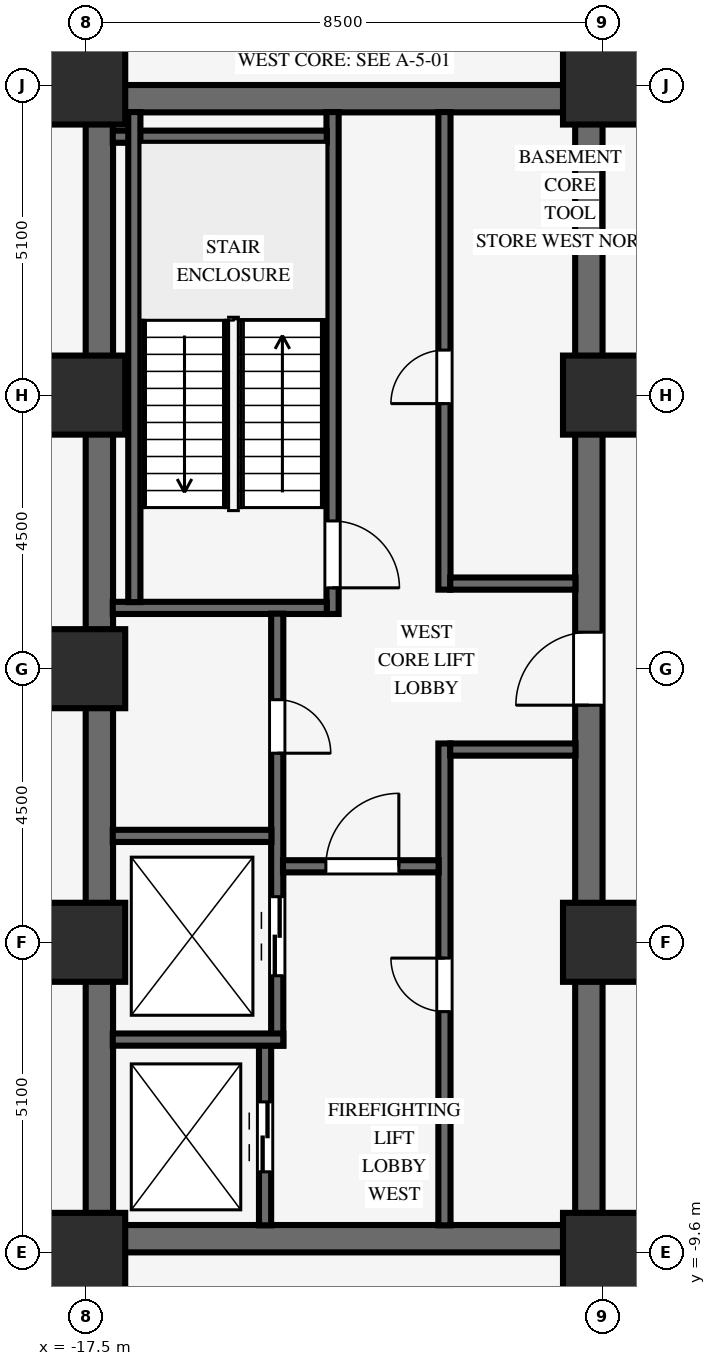
"""IFC4 building model, lengths in metres.
Left out: names, types, materials, properties, quantities, classifications, styles, units other than length and angle.
Written with IfcOpenShell. Run it as: python <this file> out.ifc"""

import sys

from ifc_helpers import new_model, si_unit, direction, frame, frame_2d, origin, origin_2d, place, context, subcontext, project, spatial, rectangle, extrude, source, transform, mapped, element, fill, save


model = new_model("IFC4")
c1 = context("Model", 3, precision=1e-05, world=origin(), true_north=direction((0.0, 1.0)))
c2 = subcontext(c1, "Body", "Model", "MODEL_VIEW")
j1 = project(units=[si_unit("LENGTHUNIT", "METRE"), si_unit("PLANEANGLEUNIT", "RADIAN")], contexts=[c1])
p1 = place(None, origin())
s1 = spatial("IfcSite", under=j1, at=p1, CompositionType="ELEMENT")
p2 = place(p1, origin())
s2 = spatial("IfcBuilding", under=s1, at=p2, CompositionType="ELEMENT")
p3 = place(p2, frame((0.0, 0.0, -8.4)))
s3 = spatial("IfcBuildingStorey", under=s2, at=p3, CompositionType="ELEMENT", Elevation=-8.4)
for number, where, z_axis, x_axis in (
    (1, (-17.5, -9.375, 0.0), (0.0, 0.0, 1.0), (1.0, 0.0, 0.0)),
    (2, (-17.5, 9.375, 0.0), (0.0, 0.0, 1.0), (1.0, 0.0, 0.0)),
):
    element("IfcWall", number, at=place(p3, frame(where, z_axis=z_axis, x_axis=x_axis)), inside=s3, PredefinedType="SHEAR", context=c2, shape_type="SweptSolid", body=[
        extrude(rectangle(XDim=8.5, YDim=0.45, at=frame_2d((4.25, 0.0))), origin(), (0.0, 0.0, 1.0), 3.85),
    ])
p4 = place(p3, frame((-17.275, -9.155, 0.0), z_axis=(0.0, 0.0, 1.0), x_axis=(0.0, 1.0, 0.0)))
e3 = element("IfcWall", 3, at=p4, inside=s3, PredefinedType="SHEAR", context=c2, shape_type="SweptSolid", body=[
    extrude(rectangle(XDim=18.31, YDim=0.45, at=frame_2d((9.155, 0.0))), origin(), (0.0, 0.0, 1.0), 3.85),
])
p5 = place(p3, frame((-9.225, -9.155, 0.0), z_axis=(0.0, 0.0, 1.0), x_axis=(0.0, 1.0, 0.0)))
e4 = element("IfcWall", 4, at=p5, inside=s3, PredefinedType="SHEAR", context=c2, shape_type="SweptSolid", body=[
    extrude(rectangle(XDim=18.31, YDim=0.45, at=frame_2d((9.155, 0.0))), origin(), (0.0, 0.0, 1.0), 3.85),
])
p6 = place(p5, frame((8.555, 0.0, 0.0)))
e5 = element("IfcOpeningElement", 5, at=p6, cuts=e4, PredefinedType="OPENING", context=c2, shape_type="SweptSolid", body=[
    extrude(rectangle(XDim=1.2, YDim=2.15, at=frame_2d((0.6, 1.075))), frame((0.0, 0.235, 0.0), z_axis=(0.0, -1.0, 0.0), x_axis=(1.0, 0.0, 0.0)), (0.0, 0.0, 1.0), 0.47),
])
for number, where, z_axis, x_axis in (
    (6, (-17.5, -9.6, 0.0), (0.0, 0.0, 1.0), (1.0, 0.0, 0.0)),
    (7, (-17.5, -4.5, 0.0), (0.0, 0.0, 1.0), (1.0, 0.0, 0.0)),
    (8, (-17.5, 4.5, 0.0), (0.0, 0.0, 1.0), (1.0, 0.0, 0.0)),
    (9, (-17.5, 9.6, 0.0), (0.0, 0.0, 1.0), (1.0, 0.0, 0.0)),
    (10, (-9.0, -9.6, 0.0), (0.0, 0.0, 1.0), (1.0, 0.0, 0.0)),
    (11, (-9.0, -4.5, 0.0), (0.0, 0.0, 1.0), (1.0, 0.0, 0.0)),
    (12, (-9.0, 4.5, 0.0), (0.0, 0.0, 1.0), (1.0, 0.0, 0.0)),
    (13, (-9.0, 9.6, 0.0), (0.0, 0.0, 1.0), (1.0, 0.0, 0.0)),
    (14, (-17.5, 0.0, 0.0), (0.0, 0.0, 1.0), (1.0, 0.0, 0.0)),
):
    element("IfcColumn", number, at=place(p3, frame(where, z_axis=z_axis, x_axis=x_axis)), inside=s3, PredefinedType="COLUMN", context=c2, shape_type="SweptSolid", body=[
        extrude(rectangle(XDim=1.3, YDim=1.3, at=origin_2d()), origin(), (0.0, 0.0, 1.0), 3.85),
    ])
p7 = place(p3, frame((-13.44, 0.9, 0.0), z_axis=(0.0, 0.0, 1.0), x_axis=(0.0, 1.0, 0.0)))
e15 = element("IfcWall", 15, at=p7, inside=s3, PredefinedType="SHEAR", context=c2, shape_type="SweptSolid", body=[
    extrude(rectangle(XDim=8.255, YDim=0.2, at=frame_2d((4.127, 0.0))), origin(), (0.0, 0.0, 1.0), 3.85),
])
p8 = place(p7, frame((1.53, 0.0, 0.0), z_axis=(0.0, 0.0, 1.0), x_axis=(-1.0, 0.0, 0.0)))
e16 = element("IfcOpeningElement", 16, at=p8, cuts=e15, PredefinedType="OPENING", context=c2, shape_type="SweptSolid", body=[
    extrude(rectangle(XDim=1.1, YDim=2.15, at=frame_2d((0.55, 1.075))), frame((0.0, 0.11, 0.0), z_axis=(0.0, -1.0, 0.0), x_axis=(1.0, 0.0, 0.0)), (0.0, 0.0, 1.0), 0.22),
])
for number, where, z_axis, x_axis in (
    (17, (-17.055, 1.0, 0.0), (0.0, 0.0, 1.0), (1.0, 0.0, 0.0)),
    (18, (-17.055, 8.75, 0.0), (0.0, 0.0, 1.0), (1.0, 0.0, 0.0)),
):
    element("IfcWall", number, at=place(p3, frame(where, z_axis=z_axis, x_axis=x_axis)), inside=s3, PredefinedType="SHEAR", context=c2, shape_type="SweptSolid", body=[
        extrude(rectangle(XDim=3.52, YDim=0.2, at=frame_2d((1.76, 0.0))), origin(), (0.0, 0.0, 1.0), 3.85),
    ])
p9 = place(p3, frame((-16.7, 1.095, 0.0), z_axis=(0.0, 0.0, 1.0), x_axis=(0.0, 1.0, 0.0)))
e19 = element("IfcWall", 19, at=p9, inside=s3, PredefinedType="SHEAR", context=c2, shape_type="SweptSolid", body=[
    extrude(rectangle(XDim=8.06, YDim=0.2, at=frame_2d((4.03, 0.0))), origin(), (0.0, 0.0, 1.0), 3.85),
])
p10 = place(p3, frame((-14.55, -9.155, 0.0), z_axis=(0.0, 0.0, 1.0), x_axis=(0.0, 1.0, 0.0)))
e20 = element("IfcWall", 20, at=p10, inside=s3, PredefinedType="SHEAR", context=c2, shape_type="SweptSolid", body=[
    extrude(rectangle(XDim=2.96, YDim=0.2, at=frame_2d((1.48, 0.0))), origin(), (0.0, 0.0, 1.0), 3.85),
])
p11 = place(p10, frame((0.88, 0.0, 0.0)))
e21 = element("IfcOpeningElement", 21, at=p11, cuts=e20, PredefinedType="OPENING", context=c2, shape_type="SweptSolid", body=[
    extrude(rectangle(XDim=1.15, YDim=2.15, at=frame_2d((0.575, 1.075))), frame((0.0, 0.11, 0.0), z_axis=(0.0, -1.0, 0.0), x_axis=(1.0, 0.0, 0.0)), (0.0, 0.0, 1.0), 0.22),
])
p12 = place(p3, frame((-14.35, -6.2, 0.0), z_axis=(0.0, 0.0, 1.0), x_axis=(0.0, 1.0, 0.0)))
e22 = element("IfcWall", 22, at=p12, inside=s3, PredefinedType="SHEAR", context=c2, shape_type="SweptSolid", body=[
    extrude(rectangle(XDim=7.105, YDim=0.2, at=frame_2d((3.552, 0.0))), origin(), (0.0, 0.0, 1.0), 3.85),
])
p13 = place(p12, frame((5.69, 0.0, 0.0), z_axis=(0.0, 0.0, 1.0), x_axis=(-1.0, 0.0, 0.0)))
e23 = element("IfcOpeningElement", 23, at=p13, cuts=e22, PredefinedType="OPENING", context=c2, shape_type="SweptSolid", body=[
    extrude(rectangle(XDim=0.88, YDim=2.1, at=frame_2d((0.44, 1.05))), frame((0.0, 0.11, 0.0), z_axis=(0.0, -1.0, 0.0), x_axis=(1.0, 0.0, 0.0)), (0.0, 0.0, 1.0), 0.22),
])
p14 = place(p12, frame((1.15, 0.0, 0.0)))
e24 = element("IfcOpeningElement", 24, at=p14, cuts=e22, PredefinedType="OPENING", context=c2, shape_type="SweptSolid", body=[
    extrude(rectangle(XDim=1.3, YDim=2.2, at=frame_2d((0.65, 1.1))), frame((0.0, 0.11, 0.0), z_axis=(0.0, -1.0, 0.0), x_axis=(1.0, 0.0, 0.0)), (0.0, 0.0, 1.0), 0.22),
])
p15 = place(p3, frame((-17.055, -6.1, 0.0), z_axis=(0.0, 0.0, 1.0), x_axis=(1.0, 0.0, 0.0)))
e25 = element("IfcWall", 25, at=p15, inside=s3, PredefinedType="SHEAR", context=c2, shape_type="SweptSolid", body=[
    extrude(rectangle(XDim=2.805, YDim=0.2, at=frame_2d((1.402, 0.0))), origin(), (0.0, 0.0, 1.0), 3.85),
])
p16 = place(p3, frame((-17.055, -2.75, 0.0), z_axis=(0.0, 0.0, 1.0), x_axis=(1.0, 0.0, 0.0)))
e26 = element("IfcWall", 26, at=p16, inside=s3, PredefinedType="SHEAR", context=c2, shape_type="SweptSolid", body=[
    extrude(rectangle(XDim=2.61, YDim=0.2, at=frame_2d((1.305, 0.0))), origin(), (0.0, 0.0, 1.0), 3.85),
])
p17 = place(p3, frame((-11.6, -9.155, 0.0), z_axis=(0.0, 0.0, 1.0), x_axis=(0.0, 1.0, 0.0)))
e27 = element("IfcWall", 27, at=p17, inside=s3, PredefinedType="SHEAR", context=c2, shape_type="SweptSolid", body=[
    extrude(rectangle(XDim=7.925, YDim=0.2, at=frame_2d((3.962, 0.0))), origin(), (0.0, 0.0, 1.0), 3.85),
])
p18 = place(p17, frame((3.515, 0.0, 0.0)))
e28 = element("IfcOpeningElement", 28, at=p18, cuts=e27, PredefinedType="OPENING", context=c2, shape_type="SweptSolid", body=[
    extrude(rectangle(XDim=0.88, YDim=2.1, at=frame_2d((0.44, 1.05))), frame((0.0, 0.11, 0.0), z_axis=(0.0, -1.0, 0.0), x_axis=(1.0, 0.0, 0.0)), (0.0, 0.0, 1.0), 0.22),
])
p19 = place(p3, frame((-14.255, -3.25, 0.0), z_axis=(0.0, 0.0, 1.0), x_axis=(1.0, 0.0, 0.0)))
e29 = element("IfcWall", 29, at=p19, inside=s3, PredefinedType="SHEAR", context=c2, shape_type="SweptSolid", body=[
    extrude(rectangle(XDim=2.56, YDim=0.2, at=frame_2d((1.28, 0.0))), origin(), (0.0, 0.0, 1.0), 3.85),
])
p20 = place(p19, frame((0.705, 0.0, 0.0)))
e30 = element("IfcOpeningElement", 30, at=p20, cuts=e29, PredefinedType="OPENING", context=c2, shape_type="SweptSolid", body=[
    extrude(rectangle(XDim=1.2, YDim=2.15, at=frame_2d((0.6, 1.075))), frame((0.0, 0.11, 0.0), z_axis=(0.0, -1.0, 0.0), x_axis=(1.0, 0.0, 0.0)), (0.0, 0.0, 1.0), 0.22),
])
p21 = place(p3, frame((-11.505, -1.33, 0.0), z_axis=(0.0, 0.0, 1.0), x_axis=(1.0, 0.0, 0.0)))
e31 = element("IfcWall", 31, at=p21, inside=s3, PredefinedType="SHEAR", context=c2, shape_type="SweptSolid", body=[
    extrude(rectangle(XDim=2.06, YDim=0.2, at=frame_2d((1.03, 0.0))), origin(), (0.0, 0.0, 1.0), 3.85),
])
p22 = place(p3, frame((-11.6, 1.3, 0.0), z_axis=(0.0, 0.0, 1.0), x_axis=(0.0, 1.0, 0.0)))
e32 = element("IfcWall", 32, at=p22, inside=s3, PredefinedType="SHEAR", context=c2, shape_type="SweptSolid", body=[
    extrude(rectangle(XDim=7.855, YDim=0.2, at=frame_2d((3.927, 0.0))), origin(), (0.0, 0.0, 1.0), 3.85),
])
p23 = place(p22, frame((3.06, 0.0, 0.0)))
e33 = element("IfcOpeningElement", 33, at=p23, cuts=e32, PredefinedType="OPENING", context=c2, shape_type="SweptSolid", body=[
    extrude(rectangle(XDim=0.88, YDim=2.1, at=frame_2d((0.44, 1.05))), frame((0.0, 0.11, 0.0), z_axis=(0.0, -1.0, 0.0), x_axis=(1.0, 0.0, 0.0)), (0.0, 0.0, 1.0), 0.22),
])
p24 = place(p3, frame((-11.505, 1.4, 0.0), z_axis=(0.0, 0.0, 1.0), x_axis=(1.0, 0.0, 0.0)))
e34 = element("IfcWall", 34, at=p24, inside=s3, PredefinedType="SHEAR", context=c2, shape_type="SweptSolid", body=[
    extrude(rectangle(XDim=2.06, YDim=0.2, at=frame_2d((1.03, 0.0))), origin(), (0.0, 0.0, 1.0), 3.85),
])
m1 = source(origin(), c2, "Body", "SweptSolid", [
    extrude(rectangle(XDim=1.1, YDim=2.15, at=frame_2d((0.55, 1.075))), frame((0.0, 0.025, 0.0), z_axis=(0.0, -1.0, 0.0), x_axis=(1.0, 0.0, 0.0)), (0.0, 0.0, 1.0), 0.05),
])
p25 = place(p8, origin())
e35 = element("IfcDoor", 35, at=p25, inside=s3, OperationType="SINGLE_SWING_RIGHT", PredefinedType="DOOR", context=c2, shape_type="MappedRepresentation", body=[
    mapped(m1, transform((0.0, 0.0, 0.0), scale=1.0)),
])
fill(e16, e35)
m2 = source(origin(), c2, "Body", "SweptSolid", [
    extrude(rectangle(XDim=0.88, YDim=2.1, at=frame_2d((0.44, 1.05))), frame((0.0, 0.025, 0.0), z_axis=(0.0, -1.0, 0.0), x_axis=(1.0, 0.0, 0.0)), (0.0, 0.0, 1.0), 0.05),
])
p26 = place(p13, origin())
e36 = element("IfcDoor", 36, at=p26, inside=s3, OperationType="SINGLE_SWING_RIGHT", PredefinedType="DOOR", context=c2, shape_type="MappedRepresentation", body=[
    mapped(m2, transform((0.0, 0.0, 0.0), scale=1.0)),
])
fill(e23, e36)
m3 = source(origin(), c2, "Body", "SweptSolid", [
    extrude(rectangle(XDim=1.2, YDim=2.15, at=frame_2d((0.6, 1.075))), frame((0.0, 0.025, 0.0), z_axis=(0.0, -1.0, 0.0), x_axis=(1.0, 0.0, 0.0)), (0.0, 0.0, 1.0), 0.05),
])
p27 = place(p20, origin())
e37 = element("IfcDoor", 37, at=p27, inside=s3, OperationType="SINGLE_SWING_RIGHT", PredefinedType="DOOR", context=c2, shape_type="MappedRepresentation", body=[
    mapped(m3, transform((0.0, 0.0, 0.0), scale=1.0)),
])
fill(e30, e37)
p28 = place(p18, origin())
e38 = element("IfcDoor", 38, at=p28, inside=s3, OperationType="SINGLE_SWING_RIGHT", PredefinedType="DOOR", context=c2, shape_type="MappedRepresentation", body=[
    mapped(m2, transform((0.0, 0.0, 0.0), scale=1.0)),
])
fill(e28, e38)
p29 = place(p23, origin())
e39 = element("IfcDoor", 39, at=p29, inside=s3, OperationType="SINGLE_SWING_LEFT", PredefinedType="DOOR", context=c2, shape_type="MappedRepresentation", body=[
    mapped(m2, transform((0.0, 0.0, 0.0), scale=1.0)),
])
fill(e33, e39)
p30 = place(p6, origin())
e40 = element("IfcDoor", 40, at=p30, inside=s3, OperationType="SINGLE_SWING_LEFT", PredefinedType="DOOR", context=c2, shape_type="MappedRepresentation", body=[
    mapped(m3, transform((0.0, 0.0, 0.0), scale=1.0)),
])
fill(e5, e40)
m4 = source(origin(), c2, "Body", "SweptSolid", [
    extrude(rectangle(XDim=1.15, YDim=2.15, at=frame_2d((0.575, 1.075))), frame((0.0, 0.025, 0.0), z_axis=(0.0, -1.0, 0.0), x_axis=(1.0, 0.0, 0.0)), (0.0, 0.0, 1.0), 0.05),
])
p31 = place(p11, origin())
e41 = element("IfcDoor", 41, at=p31, inside=s3, OperationType="DOUBLE_DOOR_SLIDING", PredefinedType="DOOR", context=c2, shape_type="MappedRepresentation", body=[
    mapped(m4, transform((0.0, 0.0, 0.0), scale=1.0)),
])
fill(e21, e41)
m5 = source(origin(), c2, "Body", "SweptSolid", [
    extrude(rectangle(XDim=1.3, YDim=2.2, at=frame_2d((0.65, 1.1))), frame((0.0, 0.025, 0.0), z_axis=(0.0, -1.0, 0.0), x_axis=(1.0, 0.0, 0.0)), (0.0, 0.0, 1.0), 0.05),
])
p32 = place(p14, origin())
e42 = element("IfcDoor", 42, at=p32, inside=s3, OperationType="DOUBLE_DOOR_SLIDING", PredefinedType="DOOR", context=c2, shape_type="MappedRepresentation", body=[
    mapped(m5, transform((0.0, 0.0, 0.0), scale=1.0)),
])
fill(e24, e42)
save(model, sys.argv[1])
